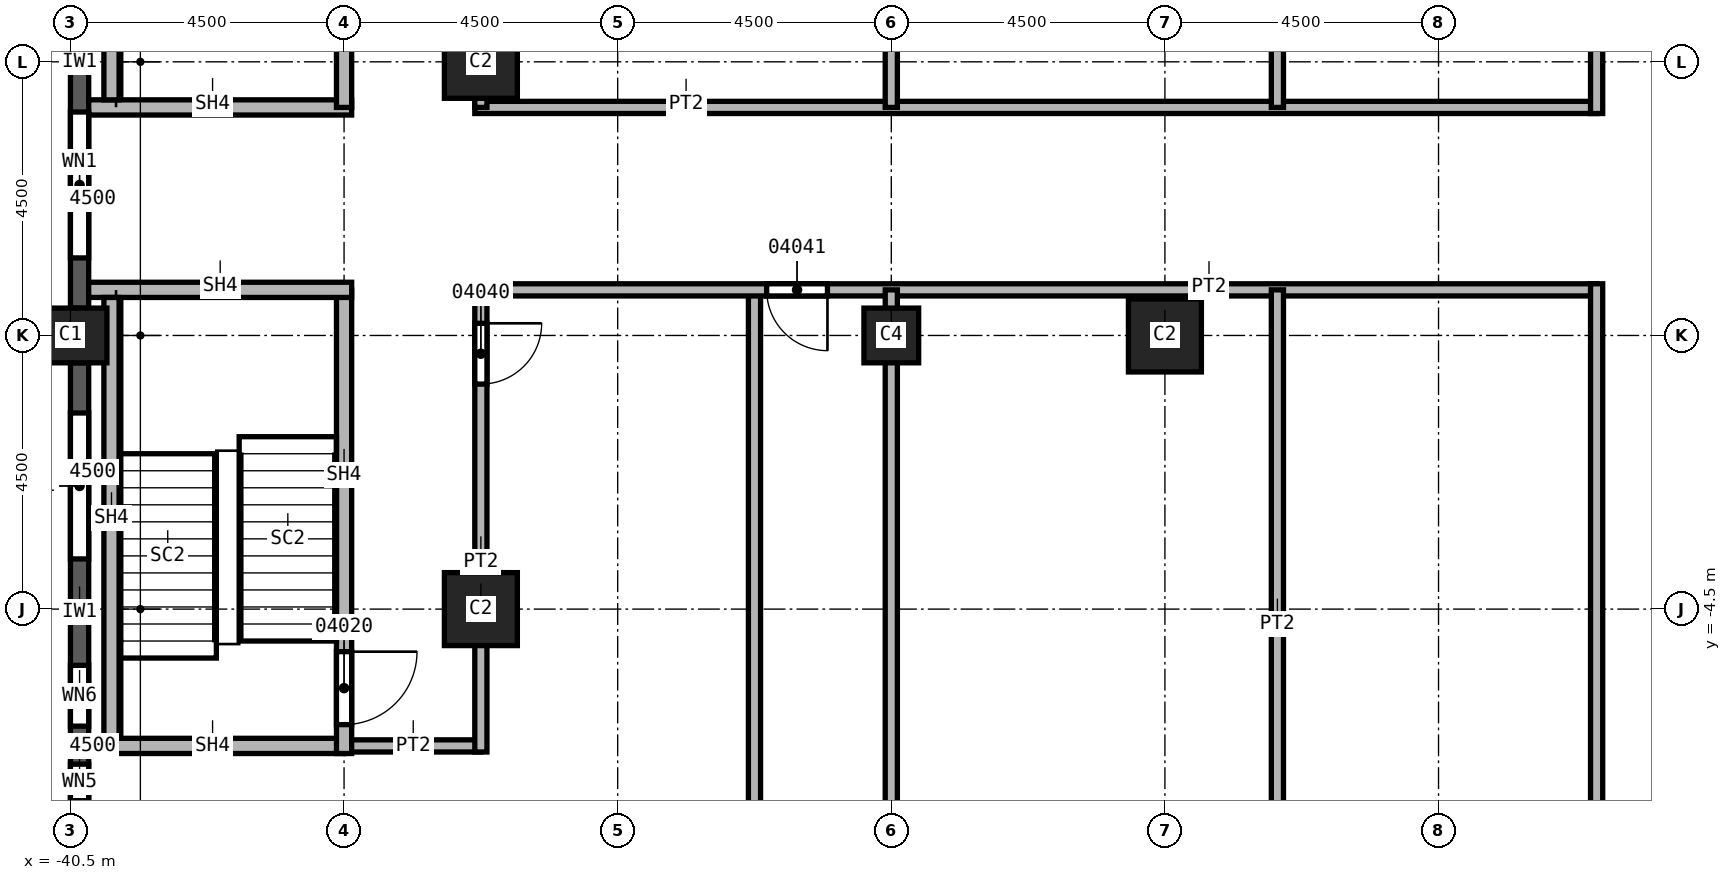
"""IFC4 building model, lengths in metres.
Left out: names, types, materials, properties, quantities, classifications, styles, units other than length and angle.
Written with IfcOpenShell. Run it as: python <this file> out.ifc"""

import sys

from ifc_helpers import new_model, si_unit, direction, frame, frame_2d, origin, origin_2d, place, context, subcontext, project, spatial, rectangle, extrude, element, fill, save


model = new_model("IFC4")
c1 = context("Model", 3, precision=1e-05, world=origin(), true_north=direction((0.0, 1.0)))
c2 = subcontext(c1, "Body", "Model", "MODEL_VIEW")
j1 = project(units=[si_unit("LENGTHUNIT", "METRE"), si_unit("PLANEANGLEUNIT", "RADIAN")], contexts=[c1])
p1 = place(None, origin())
s1 = spatial("IfcSite", under=j1, at=p1, CompositionType="ELEMENT")
p2 = place(p1, origin())
s2 = spatial("IfcBuilding", under=s1, at=p2, CompositionType="ELEMENT")
p3 = place(p2, frame((0.0, 0.0, 108.0)))
s3 = spatial("IfcBuildingStorey", under=s2, at=p3, CompositionType="ELEMENT", Elevation=108.0)
p4 = place(p3, frame((-40.5, 0.0, 0.0), z_axis=(0.0, 0.0, 1.0), x_axis=(0.0, 1.0, 0.0)))
e1 = element("IfcColumn", 1, at=p4, inside=s3, PredefinedType="COLUMN", context=c2, shape_type="SweptSolid", body=[
    extrude(rectangle(XDim=0.9, YDim=1.2, at=origin_2d()), origin(), (0.0, 0.0, 1.0), 3.7),
])
for number, where, z_axis, x_axis in (
    (2, (-33.75, 4.5, 0.0), (0.0, 0.0, 1.0), (1.0, 0.0, 0.0)),
    (3, (-33.75, -4.5, 0.0), (0.0, 0.0, 1.0), (1.0, 0.0, 0.0)),
    (4, (-22.5, 0.0, 0.0), (0.0, 0.0, 1.0), (1.0, 0.0, 0.0)),
):
    element("IfcColumn", number, at=place(p3, frame(where, z_axis=z_axis, x_axis=x_axis)), inside=s3, PredefinedType="COLUMN", context=c2, shape_type="SweptSolid", body=[
        extrude(rectangle(XDim=1.2, YDim=1.2, at=origin_2d()), origin(), (0.0, 0.0, 1.0), 3.7),
    ])
p5 = place(p3, frame((-27.0, 0.0, 0.0), z_axis=(0.0, 0.0, 1.0), x_axis=(1.0, 0.0, 0.0)))
e5 = element("IfcColumn", 5, at=p5, inside=s3, PredefinedType="COLUMN", context=c2, shape_type="SweptSolid", body=[
    extrude(rectangle(XDim=0.9, YDim=0.9, at=origin_2d()), origin(), (0.0, 0.0, 1.0), 3.7),
])
p6 = place(p3, frame((-40.35, 8.55, 0.0), z_axis=(0.0, 0.0, 1.0), x_axis=(0.0, -1.0, 0.0)))
e6 = element("IfcWall", 6, at=p6, inside=s3, PredefinedType="SOLIDWALL", context=c2, shape_type="SweptSolid", body=[
    extrude(rectangle(XDim=8.1, YDim=0.3, at=frame_2d((4.05, 0.0))), origin(), (0.0, 0.0, 1.0), 3.1),
])
p7 = place(p6, frame((0.825, 0.0, 0.8)))
e7 = element("IfcOpeningElement", 7, at=p7, cuts=e6, PredefinedType="OPENING", context=c2, shape_type="SweptSolid", body=[
    extrude(rectangle(XDim=2.4, YDim=1.95, at=frame_2d((1.2, 0.975))), frame((0.0, 0.15, 0.0), z_axis=(0.0, -1.0, 0.0), x_axis=(1.0, 0.0, 0.0)), (0.0, 0.0, 1.0), 0.3),
])
p8 = place(p6, frame((4.875, 0.0, 0.8)))
e8 = element("IfcOpeningElement", 8, at=p8, cuts=e6, PredefinedType="OPENING", context=c2, shape_type="SweptSolid", body=[
    extrude(rectangle(XDim=2.4, YDim=1.95, at=frame_2d((1.2, 0.975))), frame((0.0, 0.15, 0.0), z_axis=(0.0, -1.0, 0.0), x_axis=(1.0, 0.0, 0.0)), (0.0, 0.0, 1.0), 0.3),
])
p9 = place(p3, frame((-40.35, -0.45, 0.0), z_axis=(0.0, 0.0, 1.0), x_axis=(0.0, -1.0, 0.0)))
e9 = element("IfcWall", 9, at=p9, inside=s3, PredefinedType="SOLIDWALL", context=c2, shape_type="SweptSolid", body=[
    extrude(rectangle(XDim=8.1, YDim=0.3, at=frame_2d((4.05, 0.0))), origin(), (0.0, 0.0, 1.0), 3.1),
])
p10 = place(p9, frame((0.825, 0.0, 0.8)))
e10 = element("IfcOpeningElement", 10, at=p10, cuts=e9, PredefinedType="OPENING", context=c2, shape_type="SweptSolid", body=[
    extrude(rectangle(XDim=2.4, YDim=1.95, at=frame_2d((1.2, 0.975))), frame((0.0, 0.15, 0.0), z_axis=(0.0, -1.0, 0.0), x_axis=(1.0, 0.0, 0.0)), (0.0, 0.0, 1.0), 0.3),
])
p11 = place(p9, frame((4.975, 0.0, 0.8)))
e11 = element("IfcOpeningElement", 11, at=p11, cuts=e9, PredefinedType="OPENING", context=c2, shape_type="SweptSolid", body=[
    extrude(rectangle(XDim=1.0, YDim=1.95, at=frame_2d((0.5, 0.975))), frame((0.0, 0.15, 0.0), z_axis=(0.0, -1.0, 0.0), x_axis=(1.0, 0.0, 0.0)), (0.0, 0.0, 1.0), 0.3),
])
p12 = place(p9, frame((6.6, 0.0, 0.8)))
e12 = element("IfcOpeningElement", 12, at=p12, cuts=e9, PredefinedType="OPENING", context=c2, shape_type="SweptSolid", body=[
    extrude(rectangle(XDim=0.6, YDim=1.95, at=frame_2d((0.3, 0.975))), frame((0.0, 0.15, 0.0), z_axis=(0.0, -1.0, 0.0), x_axis=(1.0, 0.0, 0.0)), (0.0, 0.0, 1.0), 0.3),
])
p13 = place(p3, frame((-33.85, 3.75, 0.0), z_axis=(0.0, 0.0, 1.0), x_axis=(1.0, 0.0, 0.0)))
e13 = element("IfcWall", 13, at=p13, inside=s3, PredefinedType="PARTITIONING", context=c2, shape_type="SweptSolid", body=[
    extrude(rectangle(XDim=18.45, YDim=0.2, at=frame_2d((9.225, 0.0))), origin(), (0.0, 0.0, 1.0), 3.7),
])
p14 = place(p3, frame((-33.75, -6.75, 0.0), z_axis=(0.0, 0.0, 1.0), x_axis=(-1.0, 0.0, 0.0)))
e14 = element("IfcWall", 14, at=p14, inside=s3, PredefinedType="PARTITIONING", context=c2, shape_type="SweptSolid", body=[
    extrude(rectangle(XDim=2.25, YDim=0.2, at=frame_2d((1.125, 0.0))), origin(), (0.0, 0.0, 1.0), 3.7),
])
p15 = place(p3, frame((-33.75, 0.75, 0.0), z_axis=(0.0, 0.0, 1.0), x_axis=(0.0, -1.0, 0.0)))
e15 = element("IfcWall", 15, at=p15, inside=s3, PredefinedType="PARTITIONING", context=c2, shape_type="SweptSolid", body=[
    extrude(rectangle(XDim=7.6, YDim=0.2, at=frame_2d((3.8, 0.0))), origin(), (0.0, 0.0, 1.0), 3.7),
])
p16 = place(p15, frame((0.55, 0.0, 0.0)))
e16 = element("IfcOpeningElement", 16, at=p16, cuts=e15, PredefinedType="OPENING", context=c2, shape_type="SweptSolid", body=[
    extrude(rectangle(XDim=1.0, YDim=2.1, at=frame_2d((0.5, 1.05))), frame((0.0, 0.1, 0.0), z_axis=(0.0, -1.0, 0.0), x_axis=(1.0, 0.0, 0.0)), (0.0, 0.0, 1.0), 0.2),
])
p17 = place(p3, frame((-33.75, 11.25, 0.0), z_axis=(0.0, 0.0, 1.0), x_axis=(0.0, -1.0, 0.0)))
e17 = element("IfcWall", 17, at=p17, inside=s3, PredefinedType="PARTITIONING", context=c2, shape_type="SweptSolid", body=[
    extrude(rectangle(XDim=7.5, YDim=0.2, at=frame_2d((3.75, 0.0))), origin(), (0.0, 0.0, 1.0), 3.7),
])
p18 = place(p17, frame((1.45, 0.0, 0.0)))
e18 = element("IfcOpeningElement", 18, at=p18, cuts=e17, PredefinedType="OPENING", context=c2, shape_type="SweptSolid", body=[
    extrude(rectangle(XDim=1.0, YDim=2.1, at=frame_2d((0.5, 1.05))), frame((0.0, 0.1, 0.0), z_axis=(0.0, -1.0, 0.0), x_axis=(1.0, 0.0, 0.0)), (0.0, 0.0, 1.0), 0.2),
])
p19 = place(p3, frame((-29.25, 0.75, 0.0), z_axis=(0.0, 0.0, 1.0), x_axis=(0.0, -1.0, 0.0)))
e19 = element("IfcWall", 19, at=p19, inside=s3, PredefinedType="PARTITIONING", context=c2, shape_type="SweptSolid", body=[
    extrude(rectangle(XDim=18.45, YDim=0.2, at=frame_2d((9.225, 0.0))), origin(), (0.0, 0.0, 1.0), 3.7),
])
p20 = place(p3, frame((-15.4, 0.75, 0.0), z_axis=(0.0, 0.0, 1.0), x_axis=(-1.0, 0.0, 0.0)))
e20 = element("IfcWall", 20, at=p20, inside=s3, PredefinedType="PARTITIONING", context=c2, shape_type="SweptSolid", body=[
    extrude(rectangle(XDim=18.45, YDim=0.2, at=frame_2d((9.225, 0.0))), origin(), (0.0, 0.0, 1.0), 3.7),
])
p21 = place(p20, frame((12.65, 0.0, 0.0)))
e21 = element("IfcOpeningElement", 21, at=p21, cuts=e20, PredefinedType="OPENING", context=c2, shape_type="SweptSolid", body=[
    extrude(rectangle(XDim=1.0, YDim=2.1, at=frame_2d((0.5, 1.05))), frame((0.0, 0.1, 0.0), z_axis=(0.0, -1.0, 0.0), x_axis=(1.0, 0.0, 0.0)), (0.0, 0.0, 1.0), 0.2),
])
p22 = place(p3, frame((-27.0, -17.4, 0.0), z_axis=(0.0, 0.0, 1.0), x_axis=(0.0, 1.0, 0.0)))
e22 = element("IfcWall", 22, at=p22, inside=s3, PredefinedType="PARTITIONING", context=c2, shape_type="SweptSolid", body=[
    extrude(rectangle(XDim=18.15, YDim=0.2, at=frame_2d((9.075, 0.0))), origin(), (0.0, 0.0, 1.0), 3.7),
])
p23 = place(p3, frame((-27.0, 3.75, 0.0), z_axis=(0.0, 0.0, 1.0), x_axis=(0.0, 1.0, 0.0)))
e23 = element("IfcWall", 23, at=p23, inside=s3, PredefinedType="PARTITIONING", context=c2, shape_type="SweptSolid", body=[
    extrude(rectangle(XDim=13.65, YDim=0.2, at=frame_2d((6.825, 0.0))), origin(), (0.0, 0.0, 1.0), 3.7),
])
p24 = place(p3, frame((-20.65, -20.25, 0.0), z_axis=(0.0, 0.0, 1.0), x_axis=(0.0, 1.0, 0.0)))
e24 = element("IfcWall", 24, at=p24, inside=s3, PredefinedType="PARTITIONING", context=c2, shape_type="SweptSolid", body=[
    extrude(rectangle(XDim=21.0, YDim=0.2, at=frame_2d((10.5, 0.0))), origin(), (0.0, 0.0, 1.0), 3.7),
])
p25 = place(p24, frame((9.1, 0.0, 0.0)))
e25 = element("IfcOpeningElement", 25, at=p25, cuts=e24, PredefinedType="OPENING", context=c2, shape_type="SweptSolid", body=[
    extrude(rectangle(XDim=1.0, YDim=2.1, at=frame_2d((0.5, 1.05))), frame((0.0, 0.1, 0.0), z_axis=(0.0, -1.0, 0.0), x_axis=(1.0, 0.0, 0.0)), (0.0, 0.0, 1.0), 0.2),
])
p26 = place(p3, frame((-20.65, 3.75, 0.0), z_axis=(0.0, 0.0, 1.0), x_axis=(0.0, 1.0, 0.0)))
e26 = element("IfcWall", 26, at=p26, inside=s3, PredefinedType="PARTITIONING", context=c2, shape_type="SweptSolid", body=[
    extrude(rectangle(XDim=9.75, YDim=0.2, at=frame_2d((4.875, 0.0))), origin(), (0.0, 0.0, 1.0), 3.7),
])
p27 = place(p26, frame((6.1, 0.0, 0.0)))
e27 = element("IfcOpeningElement", 27, at=p27, cuts=e26, PredefinedType="OPENING", context=c2, shape_type="SweptSolid", body=[
    extrude(rectangle(XDim=1.0, YDim=2.1, at=frame_2d((0.5, 1.05))), frame((0.0, 0.1, 0.0), z_axis=(0.0, -1.0, 0.0), x_axis=(1.0, 0.0, 0.0)), (0.0, 0.0, 1.0), 0.2),
])
p28 = place(p3, frame((-15.4, -24.5, 0.0), z_axis=(0.0, 0.0, 1.0), x_axis=(0.0, 1.0, 0.0)))
e28 = element("IfcWall", 28, at=p28, inside=s3, PredefinedType="PARTITIONING", context=c2, shape_type="SweptSolid", body=[
    extrude(rectangle(XDim=25.35, YDim=0.2, at=frame_2d((12.675, 0.0))), origin(), (0.0, 0.0, 1.0), 3.7),
])
p29 = place(p28, frame((2.65, 0.0, 0.0)))
e29 = element("IfcOpeningElement", 29, at=p29, cuts=e28, PredefinedType="OPENING", context=c2, shape_type="SweptSolid", body=[
    extrude(rectangle(XDim=1.0, YDim=2.1, at=frame_2d((0.5, 1.05))), frame((0.0, 0.1, 0.0), z_axis=(0.0, -1.0, 0.0), x_axis=(1.0, 0.0, 0.0)), (0.0, 0.0, 1.0), 0.2),
])
p30 = place(p28, frame((14.3, 0.0, 0.0)))
e30 = element("IfcOpeningElement", 30, at=p30, cuts=e28, PredefinedType="OPENING", context=c2, shape_type="SweptSolid", body=[
    extrude(rectangle(XDim=1.0, YDim=2.1, at=frame_2d((0.5, 1.05))), frame((0.0, 0.1, 0.0), z_axis=(0.0, -1.0, 0.0), x_axis=(1.0, 0.0, 0.0)), (0.0, 0.0, 1.0), 0.2),
])
p31 = place(p3, frame((-15.4, 3.65, 0.0), z_axis=(0.0, 0.0, 1.0), x_axis=(0.0, 1.0, 0.0)))
e31 = element("IfcWall", 31, at=p31, inside=s3, PredefinedType="PARTITIONING", context=c2, shape_type="SweptSolid", body=[
    extrude(rectangle(XDim=9.95, YDim=0.2, at=frame_2d((4.975, 0.0))), origin(), (0.0, 0.0, 1.0), 3.7),
])
p32 = place(p31, frame((7.15, 0.0, 0.0)))
e32 = element("IfcOpeningElement", 32, at=p32, cuts=e31, PredefinedType="OPENING", context=c2, shape_type="SweptSolid", body=[
    extrude(rectangle(XDim=1.0, YDim=2.1, at=frame_2d((0.5, 1.05))), frame((0.0, 0.1, 0.0), z_axis=(0.0, -1.0, 0.0), x_axis=(1.0, 0.0, 0.0)), (0.0, 0.0, 1.0), 0.2),
])
p33 = place(p3, frame((-40.2, 3.75, 0.0), z_axis=(0.0, 0.0, 1.0), x_axis=(1.0, 0.0, 0.0)))
e33 = element("IfcWall", 33, at=p33, inside=s3, PredefinedType="SOLIDWALL", context=c2, shape_type="SweptSolid", body=[
    extrude(rectangle(XDim=4.325, YDim=0.25, at=frame_2d((2.163, 0.0))), origin(), (0.0, 0.0, 1.0), 3.7),
])
p34 = place(p3, frame((-36.0, -6.75, 0.0), z_axis=(0.0, 0.0, 1.0), x_axis=(-1.0, 0.0, 0.0)))
e34 = element("IfcWall", 34, at=p34, inside=s3, PredefinedType="SOLIDWALL", context=c2, shape_type="SweptSolid", body=[
    extrude(rectangle(XDim=4.2, YDim=0.25, at=frame_2d((2.1, 0.0))), origin(), (0.0, 0.0, 1.0), 3.7),
])
p35 = place(p3, frame((-36.0, 0.75, 0.0), z_axis=(0.0, 0.0, 1.0), x_axis=(0.0, -1.0, 0.0)))
e35 = element("IfcWall", 35, at=p35, inside=s3, PredefinedType="SOLIDWALL", context=c2, shape_type="SweptSolid", body=[
    extrude(rectangle(XDim=7.625, YDim=0.25, at=frame_2d((3.812, 0.0))), origin(), (0.0, 0.0, 1.0), 3.7),
])
p36 = place(p35, frame((5.95, 0.0, 0.0)))
e36 = element("IfcOpeningElement", 36, at=p36, cuts=e35, PredefinedType="OPENING", context=c2, shape_type="SweptSolid", body=[
    extrude(rectangle(XDim=1.2, YDim=2.1, at=frame_2d((0.6, 1.05))), frame((0.0, 0.125, 0.0), z_axis=(0.0, -1.0, 0.0), x_axis=(1.0, 0.0, 0.0)), (0.0, 0.0, 1.0), 0.25),
])
p37 = place(p3, frame((-36.0, 11.375, 0.0), z_axis=(0.0, 0.0, 1.0), x_axis=(0.0, -1.0, 0.0)))
e37 = element("IfcWall", 37, at=p37, inside=s3, PredefinedType="SOLIDWALL", context=c2, shape_type="SweptSolid", body=[
    extrude(rectangle(XDim=7.625, YDim=0.25, at=frame_2d((3.812, 0.0))), origin(), (0.0, 0.0, 1.0), 3.7),
])
p38 = place(p37, frame((0.4, 0.0, 0.0)))
e38 = element("IfcOpeningElement", 38, at=p38, cuts=e37, PredefinedType="OPENING", context=c2, shape_type="SweptSolid", body=[
    extrude(rectangle(XDim=1.2, YDim=2.1, at=frame_2d((0.6, 1.05))), frame((0.0, 0.125, 0.0), z_axis=(0.0, -1.0, 0.0), x_axis=(1.0, 0.0, 0.0)), (0.0, 0.0, 1.0), 0.25),
])
p39 = place(p3, frame((-35.875, 0.75, 0.0), z_axis=(0.0, 0.0, 1.0), x_axis=(-1.0, 0.0, 0.0)))
e39 = element("IfcWall", 39, at=p39, inside=s3, PredefinedType="SOLIDWALL", context=c2, shape_type="SweptSolid", body=[
    extrude(rectangle(XDim=4.325, YDim=0.25, at=frame_2d((2.163, 0.0))), origin(), (0.0, 0.0, 1.0), 3.7),
])
for number, where, z_axis, x_axis in (
    (40, (-39.825, 3.875, 0.0), (0.0, 0.0, 1.0), (0.0, 1.0, 0.0)),
    (41, (-39.825, -6.625, 0.0), (0.0, 0.0, 1.0), (0.0, 1.0, 0.0)),
):
    element("IfcWall", number, at=place(p3, frame(where, z_axis=z_axis, x_axis=x_axis)), inside=s3, PredefinedType="SOLIDWALL", context=c2, shape_type="SweptSolid", body=[
        extrude(rectangle(XDim=7.25, YDim=0.25, at=frame_2d((3.625, 0.0))), origin(), (0.0, 0.0, 1.0), 3.7),
    ])
p40 = place(p8, origin())
e42 = element("IfcWindow", 42, at=p40, inside=s3, PartitioningType="SINGLE_PANEL", PredefinedType="WINDOW", context=c2, shape_type="SweptSolid", body=[
    extrude(rectangle(XDim=2.4, YDim=1.95, at=frame_2d((1.2, 0.975))), frame((0.0, 0.03, 0.0), z_axis=(0.0, -1.0, 0.0), x_axis=(1.0, 0.0, 0.0)), (0.0, 0.0, 1.0), 0.06),
])
fill(e8, e42)
p41 = place(p10, origin())
e43 = element("IfcWindow", 43, at=p41, inside=s3, PartitioningType="SINGLE_PANEL", PredefinedType="WINDOW", context=c2, shape_type="SweptSolid", body=[
    extrude(rectangle(XDim=2.4, YDim=1.95, at=frame_2d((1.2, 0.975))), frame((0.0, 0.03, 0.0), z_axis=(0.0, -1.0, 0.0), x_axis=(1.0, 0.0, 0.0)), (0.0, 0.0, 1.0), 0.06),
])
fill(e10, e43)
p42 = place(p36, origin())
e44 = element("IfcDoor", 44, at=p42, inside=s3, OperationType="SINGLE_SWING_LEFT", PredefinedType="DOOR", context=c2, shape_type="SweptSolid", body=[
    extrude(rectangle(XDim=1.2, YDim=2.1, at=frame_2d((0.6, 1.05))), frame((0.0, 0.025, 0.0), z_axis=(0.0, -1.0, 0.0), x_axis=(1.0, 0.0, 0.0)), (0.0, 0.0, 1.0), 0.05),
])
fill(e36, e44)
p43 = place(p16, origin())
e45 = element("IfcDoor", 45, at=p43, inside=s3, OperationType="SINGLE_SWING_LEFT", PredefinedType="DOOR", context=c2, shape_type="SweptSolid", body=[
    extrude(rectangle(XDim=1.0, YDim=2.1, at=frame_2d((0.5, 1.05))), frame((0.0, 0.025, 0.0), z_axis=(0.0, -1.0, 0.0), x_axis=(1.0, 0.0, 0.0)), (0.0, 0.0, 1.0), 0.05),
])
fill(e16, e45)
p44 = place(p21, origin())
e46 = element("IfcDoor", 46, at=p44, inside=s3, OperationType="SINGLE_SWING_RIGHT", PredefinedType="DOOR", context=c2, shape_type="SweptSolid", body=[
    extrude(rectangle(XDim=1.0, YDim=2.1, at=frame_2d((0.5, 1.05))), frame((0.0, 0.025, 0.0), z_axis=(0.0, -1.0, 0.0), x_axis=(1.0, 0.0, 0.0)), (0.0, 0.0, 1.0), 0.05),
])
fill(e21, e46)
p45 = place(p11, origin())
e47 = element("IfcWindow", 47, at=p45, inside=s3, PartitioningType="SINGLE_PANEL", PredefinedType="WINDOW", context=c2, shape_type="SweptSolid", body=[
    extrude(rectangle(XDim=1.0, YDim=1.95, at=frame_2d((0.5, 0.975))), frame((0.0, 0.03, 0.0), z_axis=(0.0, -1.0, 0.0), x_axis=(1.0, 0.0, 0.0)), (0.0, 0.0, 1.0), 0.06),
])
fill(e11, e47)
p46 = place(p12, origin())
e48 = element("IfcWindow", 48, at=p46, inside=s3, PartitioningType="SINGLE_PANEL", PredefinedType="WINDOW", context=c2, shape_type="SweptSolid", body=[
    extrude(rectangle(XDim=0.6, YDim=1.95, at=frame_2d((0.3, 0.975))), frame((0.0, 0.03, 0.0), z_axis=(0.0, -1.0, 0.0), x_axis=(1.0, 0.0, 0.0)), (0.0, 0.0, 1.0), 0.06),
])
fill(e12, e48)
save(model, sys.argv[1])
